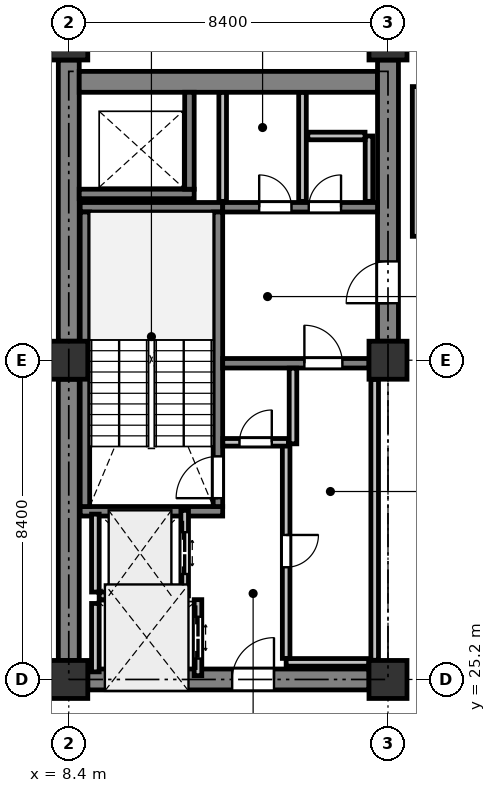
"""IFC4 building model, lengths in metres.
Left out: names, types, materials, properties, quantities, classifications, styles, units other than length and angle.
Written with IfcOpenShell. Run it as: python <this file> out.ifc"""

import sys

from ifc_helpers import new_model, si_unit, direction, frame, frame_2d, origin, origin_2d, place, context, subcontext, project, spatial, rectangle, extrude, element, fill, save


model = new_model("IFC4")
c1 = context("Model", 3, precision=1e-05, world=origin(), true_north=direction((0.0, 1.0)))
c2 = subcontext(c1, "Body", "Model", "MODEL_VIEW")
j1 = project(units=[si_unit("LENGTHUNIT", "METRE"), si_unit("PLANEANGLEUNIT", "RADIAN")], contexts=[c1])
p1 = place(None, origin())
s1 = spatial("IfcSite", under=j1, at=p1, CompositionType="ELEMENT")
p2 = place(p1, origin())
s2 = spatial("IfcBuilding", under=s1, at=p2, CompositionType="ELEMENT")
p3 = place(p2, frame((0.0, 0.0, 183.7)))
s3 = spatial("IfcBuildingStorey", under=s2, at=p3, CompositionType="ELEMENT", Elevation=183.7)
for number, where, z_axis, x_axis in (
    (1, (8.4, 25.2, 0.0), (0.0, 0.0, 1.0), (1.0, 0.0, 0.0)),
    (2, (8.4, 33.6, 0.0), (0.0, 0.0, 1.0), (1.0, 0.0, 0.0)),
    (3, (8.4, 42.0, 0.0), (0.0, 0.0, 1.0), (1.0, 0.0, 0.0)),
    (4, (16.8, 25.2, 0.0), (0.0, 0.0, 1.0), (1.0, 0.0, 0.0)),
    (5, (16.8, 33.6, 0.0), (0.0, 0.0, 1.0), (1.0, 0.0, 0.0)),
    (6, (16.8, 42.0, 0.0), (0.0, 0.0, 1.0), (1.0, 0.0, 0.0)),
):
    element("IfcColumn", number, at=place(p3, frame(where, z_axis=z_axis, x_axis=x_axis)), inside=s3, PredefinedType="COLUMN", context=c2, shape_type="SweptSolid", body=[
        extrude(rectangle(XDim=1.0, YDim=1.0, at=origin_2d()), origin(), (0.0, 0.0, 1.0), 4.1),
    ])
p4 = place(p3, frame((8.4, 25.7, 0.0), z_axis=(0.0, 0.0, 1.0), x_axis=(0.0, 1.0, 0.0)))
e7 = element("IfcWall", 7, at=p4, inside=s3, PredefinedType="SHEAR", context=c2, shape_type="SweptSolid", body=[
    extrude(rectangle(XDim=7.4, YDim=0.55, at=frame_2d((3.7, 0.0))), origin(), (0.0, 0.0, 1.0), 3.825),
])
p5 = place(p3, frame((8.4, 34.1, 0.0), z_axis=(0.0, 0.0, 1.0), x_axis=(0.0, 1.0, 0.0)))
e8 = element("IfcWall", 8, at=p5, inside=s3, PredefinedType="SHEAR", context=c2, shape_type="SweptSolid", body=[
    extrude(rectangle(XDim=7.4, YDim=0.55, at=frame_2d((3.7, 0.0))), origin(), (0.0, 0.0, 1.0), 3.825),
])
p6 = place(p3, frame((8.675, 40.925, 0.0), z_axis=(0.0, 0.0, 1.0), x_axis=(1.0, 0.0, 0.0)))
e9 = element("IfcWall", 9, at=p6, inside=s3, PredefinedType="SHEAR", context=c2, shape_type="SweptSolid", body=[
    extrude(rectangle(XDim=7.85, YDim=0.55, at=frame_2d((3.925, 0.0))), origin(), (0.0, 0.0, 1.0), 3.825),
])
p7 = place(p3, frame((16.8, 34.1, 0.0), z_axis=(0.0, 0.0, 1.0), x_axis=(0.0, 1.0, 0.0)))
e10 = element("IfcWall", 10, at=p7, inside=s3, PredefinedType="SHEAR", context=c2, shape_type="SweptSolid", body=[
    extrude(rectangle(XDim=7.4, YDim=0.55, at=frame_2d((3.7, 0.0))), origin(), (0.0, 0.0, 1.0), 3.825),
])
p8 = place(p7, frame((1.0, 0.0, 0.0)))
e11 = element("IfcOpeningElement", 11, at=p8, cuts=e10, PredefinedType="OPENING", context=c2, shape_type="SweptSolid", body=[
    extrude(rectangle(XDim=1.1, YDim=2.15, at=frame_2d((0.55, 1.075))), frame((0.0, 0.285, 0.0), z_axis=(0.0, -1.0, 0.0), x_axis=(1.0, 0.0, 0.0)), (0.0, 0.0, 1.0), 0.57),
])
p9 = place(p3, frame((8.9, 25.2, 0.0), z_axis=(0.0, 0.0, 1.0), x_axis=(1.0, 0.0, 0.0)))
e12 = element("IfcWall", 12, at=p9, inside=s3, PredefinedType="SHEAR", context=c2, shape_type="SweptSolid", body=[
    extrude(rectangle(XDim=7.4, YDim=0.55, at=frame_2d((3.7, 0.0))), origin(), (0.0, 0.0, 1.0), 3.825),
])
p10 = place(p9, frame((3.8, 0.0, 0.0)))
e13 = element("IfcOpeningElement", 13, at=p10, cuts=e12, PredefinedType="OPENING", context=c2, shape_type="SweptSolid", body=[
    extrude(rectangle(XDim=1.1, YDim=2.15, at=frame_2d((0.55, 1.075))), frame((0.0, 0.285, 0.0), z_axis=(0.0, -1.0, 0.0), x_axis=(1.0, 0.0, 0.0)), (0.0, 0.0, 1.0), 0.57),
])
for number, where, z_axis, x_axis in (
    (14, (12.45, 29.625, 0.0), (0.0, 0.0, 1.0), (-1.0, 0.0, 0.0)),
    (15, (12.45, 37.625, 0.0), (0.0, 0.0, 1.0), (-1.0, 0.0, 0.0)),
):
    element("IfcWall", number, at=place(p3, frame(where, z_axis=z_axis, x_axis=x_axis)), inside=s3, PredefinedType="SHEAR", context=c2, shape_type="SweptSolid", body=[
        extrude(rectangle(XDim=3.75, YDim=0.25, at=frame_2d((1.875, 0.0))), origin(), (0.0, 0.0, 1.0), 3.825),
    ])
p11 = place(p3, frame((12.325, 29.75, 0.0), z_axis=(0.0, 0.0, 1.0), x_axis=(0.0, 1.0, 0.0)))
e16 = element("IfcWall", 16, at=p11, inside=s3, PredefinedType="SHEAR", context=c2, shape_type="SweptSolid", body=[
    extrude(rectangle(XDim=7.75, YDim=0.25, at=frame_2d((3.875, 0.0))), origin(), (0.0, 0.0, 1.0), 3.825),
])
p12 = place(p11, frame((0.22, 0.0, 0.0)))
e17 = element("IfcOpeningElement", 17, at=p12, cuts=e16, PredefinedType="OPENING", context=c2, shape_type="SweptSolid", body=[
    extrude(rectangle(XDim=1.1, YDim=2.15, at=frame_2d((0.55, 1.075))), frame((0.0, 0.135, 0.0), z_axis=(0.0, -1.0, 0.0), x_axis=(1.0, 0.0, 0.0)), (0.0, 0.0, 1.0), 0.27),
])
p13 = place(p3, frame((8.825, 29.75, 0.0), z_axis=(0.0, 0.0, 1.0), x_axis=(0.0, 1.0, 0.0)))
e18 = element("IfcWall", 18, at=p13, inside=s3, PredefinedType="SHEAR", context=c2, shape_type="SweptSolid", body=[
    extrude(rectangle(XDim=7.75, YDim=0.25, at=frame_2d((3.875, 0.0))), origin(), (0.0, 0.0, 1.0), 3.825),
])
p14 = place(p3, frame((8.675, 37.975, 0.0), z_axis=(0.0, 0.0, 1.0), x_axis=(1.0, 0.0, 0.0)))
e19 = element("IfcWall", 19, at=p14, inside=s3, PredefinedType="SHEAR", context=c2, shape_type="SweptSolid", body=[
    extrude(rectangle(XDim=3.025, YDim=0.25, at=frame_2d((1.512, 0.0))), origin(), (0.0, 0.0, 1.0), 3.825),
])
p15 = place(p3, frame((11.575, 38.1, 0.0), z_axis=(0.0, 0.0, 1.0), x_axis=(0.0, 1.0, 0.0)))
e20 = element("IfcWall", 20, at=p15, inside=s3, PredefinedType="SHEAR", context=c2, shape_type="SweptSolid", body=[
    extrude(rectangle(XDim=2.55, YDim=0.25, at=frame_2d((1.275, 0.0))), origin(), (0.0, 0.0, 1.0), 3.825),
])
p16 = place(p3, frame((12.45, 33.52, 0.0), z_axis=(0.0, 0.0, 1.0), x_axis=(1.0, 0.0, 0.0)))
e21 = element("IfcWall", 21, at=p16, inside=s3, PredefinedType="SHEAR", context=c2, shape_type="SweptSolid", body=[
    extrude(rectangle(XDim=3.85, YDim=0.25, at=frame_2d((1.925, 0.0))), origin(), (0.0, 0.0, 1.0), 3.825),
])
p17 = place(p16, frame((2.15, 0.0, 0.0)))
e22 = element("IfcOpeningElement", 22, at=p17, cuts=e21, PredefinedType="OPENING", context=c2, shape_type="SweptSolid", body=[
    extrude(rectangle(XDim=1.0, YDim=2.15, at=frame_2d((0.5, 1.075))), frame((0.0, 0.135, 0.0), z_axis=(0.0, -1.0, 0.0), x_axis=(1.0, 0.0, 0.0)), (0.0, 0.0, 1.0), 0.27),
])
p18 = place(p3, frame((12.45, 37.625, 0.0), z_axis=(0.0, 0.0, 1.0), x_axis=(1.0, 0.0, 0.0)))
e23 = element("IfcWall", 23, at=p18, inside=s3, PredefinedType="SHEAR", context=c2, shape_type="SweptSolid", body=[
    extrude(rectangle(XDim=4.075, YDim=0.25, at=frame_2d((2.038, 0.0))), origin(), (0.0, 0.0, 1.0), 3.825),
])
p19 = place(p18, frame((0.96, 0.0, 0.0)))
e24 = element("IfcOpeningElement", 24, at=p19, cuts=e23, PredefinedType="OPENING", context=c2, shape_type="SweptSolid", body=[
    extrude(rectangle(XDim=0.85, YDim=2.15, at=frame_2d((0.425, 1.075))), frame((0.0, 0.135, 0.0), z_axis=(0.0, -1.0, 0.0), x_axis=(1.0, 0.0, 0.0)), (0.0, 0.0, 1.0), 0.27),
])
p20 = place(p18, frame((2.264, 0.0, 0.0)))
e25 = element("IfcOpeningElement", 25, at=p20, cuts=e23, PredefinedType="OPENING", context=c2, shape_type="SweptSolid", body=[
    extrude(rectangle(XDim=0.85, YDim=2.15, at=frame_2d((0.425, 1.075))), frame((0.0, 0.135, 0.0), z_axis=(0.0, -1.0, 0.0), x_axis=(1.0, 0.0, 0.0)), (0.0, 0.0, 1.0), 0.27),
])
p21 = place(p3, frame((11.45, 27.4, 0.0), z_axis=(0.0, 0.0, 1.0), x_axis=(0.0, 1.0, 0.0)))
e26 = element("IfcWall", 26, at=p21, inside=s3, PredefinedType="PARTITIONING", context=c2, shape_type="SweptSolid", body=[
    extrude(rectangle(XDim=2.25, YDim=0.2, at=frame_2d((1.125, 0.0))), origin(), (0.0, 0.0, 1.0), 3.825),
])
p22 = place(p21, frame((0.575, 0.0, 0.0)))
e27 = element("IfcOpeningElement", 27, at=p22, cuts=e26, PredefinedType="OPENING", context=c2, shape_type="SweptSolid", body=[
    extrude(rectangle(XDim=1.1, YDim=2.2, at=frame_2d((0.55, 1.1))), frame((0.0, 0.11, 0.0), z_axis=(0.0, -1.0, 0.0), x_axis=(1.0, 0.0, 0.0)), (0.0, 0.0, 1.0), 0.22),
])
p23 = place(p3, frame((9.1, 27.5, 0.0), z_axis=(0.0, 0.0, 1.0), x_axis=(0.0, 1.0, 0.0)))
e28 = element("IfcWall", 28, at=p23, inside=s3, PredefinedType="PARTITIONING", context=c2, shape_type="SweptSolid", body=[
    extrude(rectangle(XDim=2.05, YDim=0.2, at=frame_2d((1.025, 0.0))), origin(), (0.0, 0.0, 1.0), 3.825),
])
p24 = place(p3, frame((9.2, 27.4, 0.0), z_axis=(0.0, 0.0, 1.0), x_axis=(1.0, 0.0, 0.0)))
e29 = element("IfcWall", 29, at=p24, inside=s3, PredefinedType="PARTITIONING", context=c2, shape_type="SweptSolid", body=[
    extrude(rectangle(XDim=2.15, YDim=0.2, at=frame_2d((1.075, 0.0))), origin(), (0.0, 0.0, 1.0), 3.825),
])
p25 = place(p3, frame((11.8, 25.3, 0.0), z_axis=(0.0, 0.0, 1.0), x_axis=(0.0, 1.0, 0.0)))
e30 = element("IfcWall", 30, at=p25, inside=s3, PredefinedType="PARTITIONING", context=c2, shape_type="SweptSolid", body=[
    extrude(rectangle(XDim=2.0, YDim=0.2, at=frame_2d((1.0, 0.0))), origin(), (0.0, 0.0, 1.0), 3.825),
])
p26 = place(p25, frame((0.45, 0.0, 0.0)))
e31 = element("IfcOpeningElement", 31, at=p26, cuts=e30, PredefinedType="OPENING", context=c2, shape_type="SweptSolid", body=[
    extrude(rectangle(XDim=1.1, YDim=2.2, at=frame_2d((0.55, 1.1))), frame((0.0, 0.11, 0.0), z_axis=(0.0, -1.0, 0.0), x_axis=(1.0, 0.0, 0.0)), (0.0, 0.0, 1.0), 0.22),
])
p27 = place(p3, frame((9.1, 25.4, 0.0), z_axis=(0.0, 0.0, 1.0), x_axis=(0.0, 1.0, 0.0)))
e32 = element("IfcWall", 32, at=p27, inside=s3, PredefinedType="PARTITIONING", context=c2, shape_type="SweptSolid", body=[
    extrude(rectangle(XDim=1.8, YDim=0.2, at=frame_2d((0.9, 0.0))), origin(), (0.0, 0.0, 1.0), 3.825),
])
p28 = place(p3, frame((14.12, 25.65, 0.0), z_axis=(0.0, 0.0, 1.0), x_axis=(1.0, 0.0, 0.0)))
e33 = element("IfcWall", 33, at=p28, inside=s3, PredefinedType="PARTITIONING", context=c2, shape_type="SweptSolid", body=[
    extrude(rectangle(XDim=2.175, YDim=0.2, at=frame_2d((1.087, 0.0))), origin(), (0.0, 0.0, 1.0), 3.825),
])
p29 = place(p3, frame((16.45, 25.705, 0.0), z_axis=(0.0, 0.0, 1.0), x_axis=(0.0, 1.0, 0.0)))
e34 = element("IfcWall", 34, at=p29, inside=s3, PredefinedType="PARTITIONING", context=c2, shape_type="SweptSolid", body=[
    extrude(rectangle(XDim=7.39, YDim=0.2, at=frame_2d((3.695, 0.0))), origin(), (0.0, 0.0, 1.0), 3.825),
])
p30 = place(p3, frame((14.3, 33.391, 0.0), z_axis=(0.0, 0.0, 1.0), x_axis=(0.0, -1.0, 0.0)))
e35 = element("IfcWall", 35, at=p30, inside=s3, PredefinedType="PARTITIONING", context=c2, shape_type="SweptSolid", body=[
    extrude(rectangle(XDim=1.991, YDim=0.2, at=frame_2d((0.996, 0.0))), origin(), (0.0, 0.0, 1.0), 3.825),
])
p31 = place(p3, frame((14.12, 31.4, 0.0), z_axis=(0.0, 0.0, 1.0), x_axis=(0.0, -1.0, 0.0)))
e36 = element("IfcWall", 36, at=p31, inside=s3, PredefinedType="PARTITIONING", context=c2, shape_type="SweptSolid", body=[
    extrude(rectangle(XDim=5.646, YDim=0.2, at=frame_2d((2.823, 0.0))), origin(), (0.0, 0.0, 1.0), 3.825),
])
p32 = place(p31, frame((2.398, 0.0, 0.0)))
e37 = element("IfcOpeningElement", 37, at=p32, cuts=e36, PredefinedType="OPENING", context=c2, shape_type="SweptSolid", body=[
    extrude(rectangle(XDim=0.85, YDim=2.15, at=frame_2d((0.425, 1.075))), frame((0.0, 0.11, 0.0), z_axis=(0.0, -1.0, 0.0), x_axis=(1.0, 0.0, 0.0)), (0.0, 0.0, 1.0), 0.22),
])
p33 = place(p3, frame((12.454, 31.44, 0.0), z_axis=(0.0, 0.0, 1.0), x_axis=(1.0, 0.0, 0.0)))
e38 = element("IfcWall", 38, at=p33, inside=s3, PredefinedType="PARTITIONING", context=c2, shape_type="SweptSolid", body=[
    extrude(rectangle(XDim=1.726, YDim=0.2, at=frame_2d((0.863, 0.0))), origin(), (0.0, 0.0, 1.0), 3.825),
])
p34 = place(p33, frame((0.438, 0.0, 0.0)))
e39 = element("IfcOpeningElement", 39, at=p34, cuts=e38, PredefinedType="OPENING", context=c2, shape_type="SweptSolid", body=[
    extrude(rectangle(XDim=0.85, YDim=2.15, at=frame_2d((0.425, 1.075))), frame((0.0, 0.11, 0.0), z_axis=(0.0, -1.0, 0.0), x_axis=(1.0, 0.0, 0.0)), (0.0, 0.0, 1.0), 0.22),
])
for number, where, z_axis, x_axis in (
    (40, (14.55, 37.78, 0.0), (0.0, 0.0, 1.0), (0.0, 1.0, 0.0)),
    (41, (12.45, 40.646, 0.0), (0.0, 0.0, 1.0), (0.0, -1.0, 0.0)),
):
    element("IfcWall", number, at=place(p3, frame(where, z_axis=z_axis, x_axis=x_axis)), inside=s3, PredefinedType="PARTITIONING", context=c2, shape_type="SweptSolid", body=[
        extrude(rectangle(XDim=2.866, YDim=0.2, at=frame_2d((1.433, 0.0))), origin(), (0.0, 0.0, 1.0), 2.875),
    ])
p35 = place(p3, frame((16.3, 37.78, 0.0), z_axis=(0.0, 0.0, 1.0), x_axis=(0.0, 1.0, 0.0)))
e42 = element("IfcWall", 42, at=p35, inside=s3, PredefinedType="PARTITIONING", context=c2, shape_type="SweptSolid", body=[
    extrude(rectangle(XDim=1.72, YDim=0.2, at=frame_2d((0.86, 0.0))), origin(), (0.0, 0.0, 1.0), 2.875),
])
p36 = place(p3, frame((16.196, 39.5, 0.0), z_axis=(0.0, 0.0, 1.0), x_axis=(-1.0, 0.0, 0.0)))
e43 = element("IfcWall", 43, at=p36, inside=s3, PredefinedType="PARTITIONING", context=c2, shape_type="SweptSolid", body=[
    extrude(rectangle(XDim=1.506, YDim=0.2, at=frame_2d((0.753, 0.0))), origin(), (0.0, 0.0, 1.0), 2.875),
])
p37 = place(p3, frame((17.54, 36.86, 0.0), z_axis=(0.0, 0.0, 1.0), x_axis=(0.0, 1.0, 0.0)))
e44 = element("IfcWall", 44, at=p37, inside=s3, PredefinedType="PARTITIONING", context=c2, shape_type="SweptSolid", body=[
    extrude(rectangle(XDim=3.94, YDim=0.2, at=frame_2d((1.97, 0.0))), origin(), (0.0, 0.0, 1.0), 3.825),
])
p38 = place(p8, origin())
e45 = element("IfcDoor", 45, at=p38, inside=s3, OperationType="SINGLE_SWING_LEFT", PredefinedType="DOOR", context=c2, shape_type="SweptSolid", body=[
    extrude(rectangle(XDim=1.1, YDim=2.15, at=frame_2d((0.55, 1.075))), frame((0.0, 0.025, 0.0), z_axis=(0.0, -1.0, 0.0), x_axis=(1.0, 0.0, 0.0)), (0.0, 0.0, 1.0), 0.05),
])
fill(e11, e45)
p39 = place(p10, origin())
e46 = element("IfcDoor", 46, at=p39, inside=s3, OperationType="SINGLE_SWING_RIGHT", PredefinedType="DOOR", context=c2, shape_type="SweptSolid", body=[
    extrude(rectangle(XDim=1.1, YDim=2.15, at=frame_2d((0.55, 1.075))), frame((0.0, 0.025, 0.0), z_axis=(0.0, -1.0, 0.0), x_axis=(1.0, 0.0, 0.0)), (0.0, 0.0, 1.0), 0.05),
])
fill(e13, e46)
p40 = place(p12, origin())
e47 = element("IfcDoor", 47, at=p40, inside=s3, OperationType="SINGLE_SWING_LEFT", PredefinedType="DOOR", context=c2, shape_type="SweptSolid", body=[
    extrude(rectangle(XDim=1.1, YDim=2.15, at=frame_2d((0.55, 1.075))), frame((0.0, 0.025, 0.0), z_axis=(0.0, -1.0, 0.0), x_axis=(1.0, 0.0, 0.0)), (0.0, 0.0, 1.0), 0.05),
])
fill(e17, e47)
p41 = place(p17, origin())
e48 = element("IfcDoor", 48, at=p41, inside=s3, OperationType="SINGLE_SWING_LEFT", PredefinedType="DOOR", context=c2, shape_type="SweptSolid", body=[
    extrude(rectangle(XDim=1.0, YDim=2.15, at=frame_2d((0.5, 1.075))), frame((0.0, 0.025, 0.0), z_axis=(0.0, -1.0, 0.0), x_axis=(1.0, 0.0, 0.0)), (0.0, 0.0, 1.0), 0.05),
])
fill(e22, e48)
p42 = place(p22, origin())
e49 = element("IfcDoor", 49, at=p42, inside=s3, OperationType="DOUBLE_DOOR_SLIDING", PredefinedType="DOOR", context=c2, shape_type="SweptSolid", body=[
    extrude(rectangle(XDim=1.1, YDim=2.2, at=frame_2d((0.55, 1.1))), frame((0.0, 0.025, 0.0), z_axis=(0.0, -1.0, 0.0), x_axis=(1.0, 0.0, 0.0)), (0.0, 0.0, 1.0), 0.05),
])
fill(e27, e49)
p43 = place(p26, origin())
e50 = element("IfcDoor", 50, at=p43, inside=s3, OperationType="DOUBLE_DOOR_SLIDING", PredefinedType="DOOR", context=c2, shape_type="SweptSolid", body=[
    extrude(rectangle(XDim=1.1, YDim=2.2, at=frame_2d((0.55, 1.1))), frame((0.0, 0.025, 0.0), z_axis=(0.0, -1.0, 0.0), x_axis=(1.0, 0.0, 0.0)), (0.0, 0.0, 1.0), 0.05),
])
fill(e31, e50)
p44 = place(p32, origin())
e51 = element("IfcDoor", 51, at=p44, inside=s3, OperationType="SINGLE_SWING_LEFT", PredefinedType="DOOR", context=c2, shape_type="SweptSolid", body=[
    extrude(rectangle(XDim=0.85, YDim=2.15, at=frame_2d((0.425, 1.075))), frame((0.0, 0.025, 0.0), z_axis=(0.0, -1.0, 0.0), x_axis=(1.0, 0.0, 0.0)), (0.0, 0.0, 1.0), 0.05),
])
fill(e37, e51)
p45 = place(p34, origin())
e52 = element("IfcDoor", 52, at=p45, inside=s3, OperationType="SINGLE_SWING_RIGHT", PredefinedType="DOOR", context=c2, shape_type="SweptSolid", body=[
    extrude(rectangle(XDim=0.85, YDim=2.15, at=frame_2d((0.425, 1.075))), frame((0.0, 0.025, 0.0), z_axis=(0.0, -1.0, 0.0), x_axis=(1.0, 0.0, 0.0)), (0.0, 0.0, 1.0), 0.05),
])
fill(e39, e52)
p46 = place(p19, origin())
e53 = element("IfcDoor", 53, at=p46, inside=s3, OperationType="SINGLE_SWING_LEFT", PredefinedType="DOOR", context=c2, shape_type="SweptSolid", body=[
    extrude(rectangle(XDim=0.85, YDim=2.15, at=frame_2d((0.425, 1.075))), frame((0.0, 0.025, 0.0), z_axis=(0.0, -1.0, 0.0), x_axis=(1.0, 0.0, 0.0)), (0.0, 0.0, 1.0), 0.05),
])
fill(e24, e53)
p47 = place(p20, origin())
e54 = element("IfcDoor", 54, at=p47, inside=s3, OperationType="SINGLE_SWING_RIGHT", PredefinedType="DOOR", context=c2, shape_type="SweptSolid", body=[
    extrude(rectangle(XDim=0.85, YDim=2.15, at=frame_2d((0.425, 1.075))), frame((0.0, 0.025, 0.0), z_axis=(0.0, -1.0, 0.0), x_axis=(1.0, 0.0, 0.0)), (0.0, 0.0, 1.0), 0.05),
])
fill(e25, e54)
save(model, sys.argv[1])
